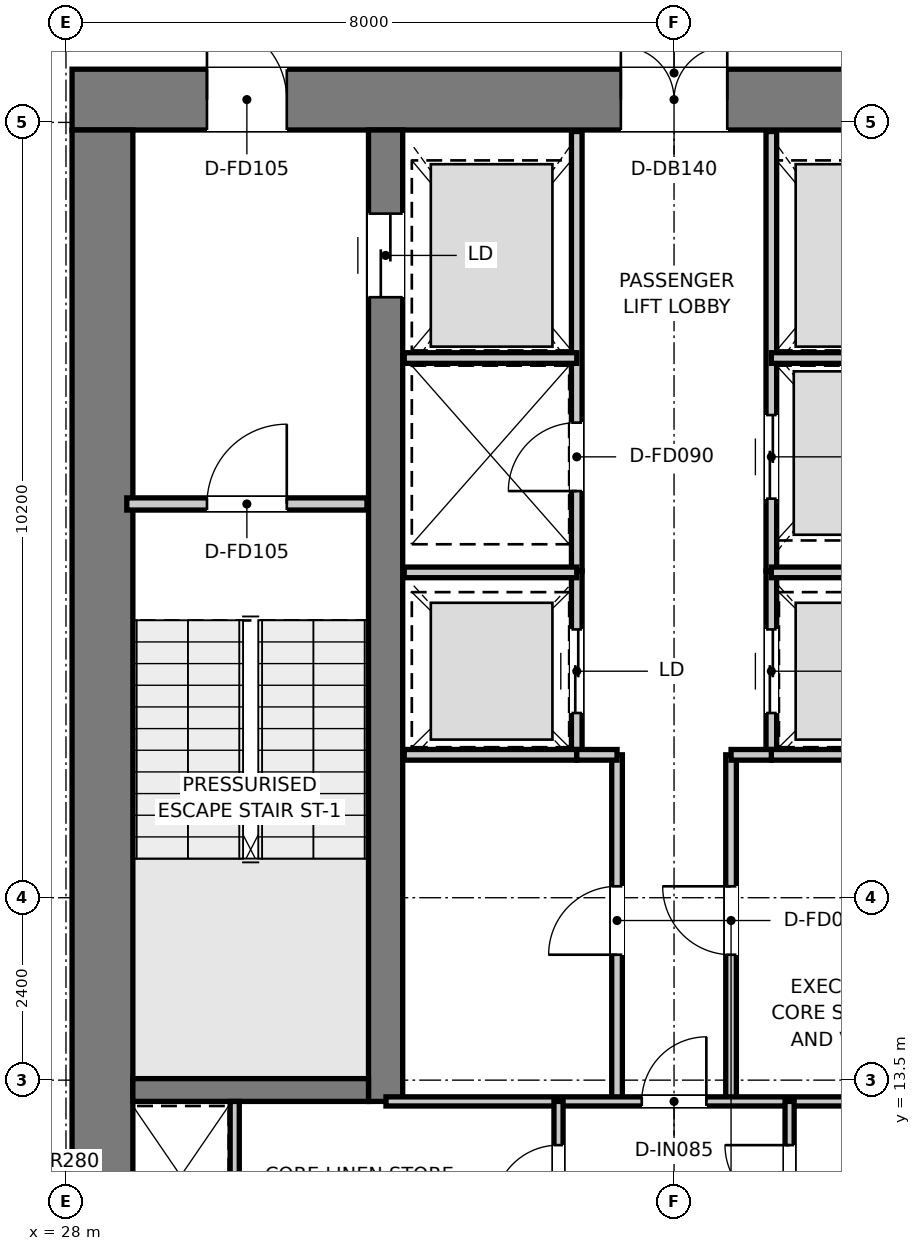
"""IFC4 building model, lengths in metres.
Left out: names, types, materials, properties, quantities, classifications, styles, units other than length and angle.
Written with IfcOpenShell. Run it as: python <this file> out.ifc"""

import sys

from ifc_helpers import new_model, si_unit, direction, frame, frame_2d, origin, place, context, subcontext, project, spatial, rectangle, extrude, element, fill, save


model = new_model("IFC4")
c1 = context("Model", 3, precision=1e-05, world=origin(), true_north=direction((0.0, 1.0)))
c2 = subcontext(c1, "Body", "Model", "MODEL_VIEW")
j1 = project(units=[si_unit("LENGTHUNIT", "METRE"), si_unit("PLANEANGLEUNIT", "RADIAN")], contexts=[c1])
p1 = place(None, origin())
s1 = spatial("IfcSite", under=j1, at=p1, CompositionType="ELEMENT")
p2 = place(p1, origin())
s2 = spatial("IfcBuilding", under=s1, at=p2, CompositionType="ELEMENT")
p3 = place(p2, frame((0.0, 0.0, 299.0)))
s3 = spatial("IfcBuildingStorey", under=s2, at=p3, CompositionType="ELEMENT", Elevation=299.0)
p4 = place(p3, frame((28.08, 26.4, 0.0), z_axis=(0.0, 0.0, 1.0), x_axis=(1.0, 0.0, 0.0)))
e1 = element("IfcWall", 1, at=p4, inside=s3, PredefinedType="SHEAR", context=c2, shape_type="SweptSolid", body=[
    extrude(rectangle(XDim=15.84, YDim=0.8, at=frame_2d((7.92, 0.0))), origin(), (0.0, 0.0, 1.0), 3.95),
])
p5 = place(p4, frame((7.22, 0.0, 0.0)))
e2 = element("IfcOpeningElement", 2, at=p5, cuts=e1, PredefinedType="OPENING", context=c2, shape_type="SweptSolid", body=[
    extrude(rectangle(XDim=1.4, YDim=2.2, at=frame_2d((0.7, 1.1))), frame((0.0, 0.41, 0.0), z_axis=(0.0, -1.0, 0.0), x_axis=(1.0, 0.0, 0.0)), (0.0, 0.0, 1.0), 0.82),
])
p6 = place(p4, frame((1.775, 0.0, 0.0)))
e3 = element("IfcOpeningElement", 3, at=p6, cuts=e1, PredefinedType="OPENING", context=c2, shape_type="SweptSolid", body=[
    extrude(rectangle(XDim=1.05, YDim=2.1, at=frame_2d((0.525, 1.05))), frame((0.0, 0.41, 0.0), z_axis=(0.0, -1.0, 0.0), x_axis=(1.0, 0.0, 0.0)), (0.0, 0.0, 1.0), 0.82),
])
p7 = place(p4, frame((13.015, 0.0, 0.0)))
e4 = element("IfcOpeningElement", 4, at=p7, cuts=e1, PredefinedType="OPENING", context=c2, shape_type="SweptSolid", body=[
    extrude(rectangle(XDim=1.05, YDim=2.1, at=frame_2d((0.525, 1.05))), frame((0.0, 0.41, 0.0), z_axis=(0.0, -1.0, 0.0), x_axis=(1.0, 0.0, 0.0)), (0.0, 0.0, 1.0), 0.82),
])
p8 = place(p3, frame((28.48, 11.3, 0.0), z_axis=(0.0, 0.0, 1.0), x_axis=(0.0, 1.0, 0.0)))
e5 = element("IfcWall", 5, at=p8, inside=s3, PredefinedType="SHEAR", context=c2, shape_type="SweptSolid", body=[
    extrude(rectangle(XDim=14.7, YDim=0.8, at=frame_2d((7.35, 0.0))), origin(), (0.0, 0.0, 1.0), 3.95),
])
p9 = place(p3, frame((32.205, 13.22, 0.0), z_axis=(0.0, 0.0, 1.0), x_axis=(0.0, 1.0, 0.0)))
e6 = element("IfcWall", 6, at=p9, inside=s3, PredefinedType="SHEAR", context=c2, shape_type="SweptSolid", body=[
    extrude(rectangle(XDim=12.78, YDim=0.45, at=frame_2d((6.39, 0.0))), origin(), (0.0, 0.0, 1.0), 3.95),
])
p10 = place(p9, frame((10.58, 0.0, 0.0)))
e7 = element("IfcOpeningElement", 7, at=p10, cuts=e6, PredefinedType="OPENING", context=c2, shape_type="SweptSolid", body=[
    extrude(rectangle(XDim=1.1, YDim=2.15, at=frame_2d((0.55, 1.075))), frame((0.0, 0.235, 0.0), z_axis=(0.0, -1.0, 0.0), x_axis=(1.0, 0.0, 0.0)), (0.0, 0.0, 1.0), 0.47),
])
p11 = place(p3, frame((28.88, 13.37, 0.0), z_axis=(0.0, 0.0, 1.0), x_axis=(1.0, 0.0, 0.0)))
e8 = element("IfcWall", 8, at=p11, inside=s3, PredefinedType="SHEAR", context=c2, shape_type="SweptSolid", body=[
    extrude(rectangle(XDim=3.1, YDim=0.3, at=frame_2d((1.55, 0.0))), origin(), (0.0, 0.0, 1.0), 3.95),
])
p12 = place(p3, frame((28.8, 21.08, 0.0), z_axis=(0.0, 0.0, 1.0), x_axis=(1.0, 0.0, 0.0)))
e9 = element("IfcWall", 9, at=p12, inside=s3, PredefinedType="PARTITIONING", context=c2, shape_type="SweptSolid", body=[
    extrude(rectangle(XDim=3.16, YDim=0.16, at=frame_2d((1.58, 0.0))), origin(), (0.0, 0.0, 1.0), 3.67),
])
p13 = place(p12, frame((1.055, 0.0, 0.0)))
e10 = element("IfcOpeningElement", 10, at=p13, cuts=e9, PredefinedType="OPENING", context=c2, shape_type="SweptSolid", body=[
    extrude(rectangle(XDim=1.05, YDim=2.1, at=frame_2d((0.525, 1.05))), frame((0.0, 0.09, 0.0), z_axis=(0.0, -1.0, 0.0), x_axis=(1.0, 0.0, 0.0)), (0.0, 0.0, 1.0), 0.18),
])
p14 = place(p3, frame((34.72, 20.2, 0.0), z_axis=(0.0, 0.0, 1.0), x_axis=(0.0, 1.0, 0.0)))
e11 = element("IfcWall", 11, at=p14, inside=s3, PredefinedType="PARTITIONING", context=c2, shape_type="SweptSolid", body=[
    extrude(rectangle(XDim=5.78, YDim=0.14, at=frame_2d((2.89, 0.0))), origin(), (0.0, 0.0, 1.0), 2.82),
])
p15 = place(p14, frame((1.05, 0.0, 0.0)))
e12 = element("IfcOpeningElement", 12, at=p15, cuts=e11, PredefinedType="OPENING", context=c2, shape_type="SweptSolid", body=[
    extrude(rectangle(XDim=0.9, YDim=2.1, at=frame_2d((0.45, 1.05))), frame((0.0, 0.08, 0.0), z_axis=(0.0, -1.0, 0.0), x_axis=(1.0, 0.0, 0.0)), (0.0, 0.0, 1.0), 0.16),
])
p16 = place(p3, frame((37.28, 20.2, 0.0), z_axis=(0.0, 0.0, 1.0), x_axis=(0.0, 1.0, 0.0)))
e13 = element("IfcWall", 13, at=p16, inside=s3, PredefinedType="PARTITIONING", context=c2, shape_type="SweptSolid", body=[
    extrude(rectangle(XDim=5.78, YDim=0.14, at=frame_2d((2.89, 0.0))), origin(), (0.0, 0.0, 1.0), 2.82),
])
p17 = place(p16, frame((0.95, 0.0, 0.0)))
e14 = element("IfcOpeningElement", 14, at=p17, cuts=e13, PredefinedType="OPENING", context=c2, shape_type="SweptSolid", body=[
    extrude(rectangle(XDim=1.1, YDim=2.15, at=frame_2d((0.55, 1.075))), frame((0.0, 0.08, 0.0), z_axis=(0.0, -1.0, 0.0), x_axis=(1.0, 0.0, 0.0)), (0.0, 0.0, 1.0), 0.16),
])
for number, where, z_axis, x_axis in (
    (15, (32.45, 23.0, 0.0), (0.0, 0.0, 1.0), (1.0, 0.0, 0.0)),
    (16, (37.28, 23.0, 0.0), (0.0, 0.0, 1.0), (1.0, 0.0, 0.0)),
):
    element("IfcWall", number, at=place(p3, frame(where, z_axis=z_axis, x_axis=x_axis)), inside=s3, PredefinedType="PARTITIONING", context=c2, shape_type="SweptSolid", body=[
        extrude(rectangle(XDim=2.27, YDim=0.14, at=frame_2d((1.135, 0.0))), origin(), (0.0, 0.0, 1.0), 2.82),
    ])
p18 = place(p3, frame((34.72, 17.78, 0.0), z_axis=(0.0, 0.0, 1.0), x_axis=(0.0, 1.0, 0.0)))
e17 = element("IfcWall", 17, at=p18, inside=s3, PredefinedType="PARTITIONING", context=c2, shape_type="SweptSolid", body=[
    extrude(rectangle(XDim=2.42, YDim=0.14, at=frame_2d((1.21, 0.0))), origin(), (0.0, 0.0, 1.0), 3.67),
])
p19 = place(p18, frame((0.55, 0.0, 0.0)))
e18 = element("IfcOpeningElement", 18, at=p19, cuts=e17, PredefinedType="OPENING", context=c2, shape_type="SweptSolid", body=[
    extrude(rectangle(XDim=1.1, YDim=2.15, at=frame_2d((0.55, 1.075))), frame((0.0, 0.08, 0.0), z_axis=(0.0, -1.0, 0.0), x_axis=(1.0, 0.0, 0.0)), (0.0, 0.0, 1.0), 0.16),
])
p20 = place(p3, frame((37.28, 17.78, 0.0), z_axis=(0.0, 0.0, 1.0), x_axis=(0.0, 1.0, 0.0)))
e19 = element("IfcWall", 19, at=p20, inside=s3, PredefinedType="PARTITIONING", context=c2, shape_type="SweptSolid", body=[
    extrude(rectangle(XDim=2.42, YDim=0.14, at=frame_2d((1.21, 0.0))), origin(), (0.0, 0.0, 1.0), 3.67),
])
p21 = place(p20, frame((0.55, 0.0, 0.0)))
e20 = element("IfcOpeningElement", 20, at=p21, cuts=e19, PredefinedType="OPENING", context=c2, shape_type="SweptSolid", body=[
    extrude(rectangle(XDim=1.1, YDim=2.15, at=frame_2d((0.55, 1.075))), frame((0.0, 0.08, 0.0), z_axis=(0.0, -1.0, 0.0), x_axis=(1.0, 0.0, 0.0)), (0.0, 0.0, 1.0), 0.16),
])
for number, where, z_axis, x_axis in (
    (21, (32.45, 17.78, 0.0), (0.0, 0.0, 1.0), (1.0, 0.0, 0.0)),
    (22, (32.45, 20.18, 0.0), (0.0, 0.0, 1.0), (1.0, 0.0, 0.0)),
    (23, (37.28, 17.78, 0.0), (0.0, 0.0, 1.0), (1.0, 0.0, 0.0)),
    (24, (37.28, 20.18, 0.0), (0.0, 0.0, 1.0), (1.0, 0.0, 0.0)),
):
    element("IfcWall", number, at=place(p3, frame(where, z_axis=z_axis, x_axis=x_axis)), inside=s3, PredefinedType="PARTITIONING", context=c2, shape_type="SweptSolid", body=[
        extrude(rectangle(XDim=2.27, YDim=0.14, at=frame_2d((1.135, 0.0))), origin(), (0.0, 0.0, 1.0), 3.67),
    ])
p22 = place(p3, frame((35.25, 13.22, 0.0), z_axis=(0.0, 0.0, 1.0), x_axis=(0.0, 1.0, 0.0)))
e25 = element("IfcWall", 25, at=p22, inside=s3, PredefinedType="PARTITIONING", context=c2, shape_type="SweptSolid", body=[
    extrude(rectangle(XDim=4.56, YDim=0.14, at=frame_2d((2.28, 0.0))), origin(), (0.0, 0.0, 1.0), 3.67),
])
p23 = place(p22, frame((1.93, 0.0, 0.0)))
e26 = element("IfcOpeningElement", 26, at=p23, cuts=e25, PredefinedType="OPENING", context=c2, shape_type="SweptSolid", body=[
    extrude(rectangle(XDim=0.9, YDim=2.1, at=frame_2d((0.45, 1.05))), frame((0.0, 0.08, 0.0), z_axis=(0.0, -1.0, 0.0), x_axis=(1.0, 0.0, 0.0)), (0.0, 0.0, 1.0), 0.16),
])
p24 = place(p3, frame((34.72, 17.78, 0.0), z_axis=(0.0, 0.0, 1.0), x_axis=(1.0, 0.0, 0.0)))
e27 = element("IfcWall", 27, at=p24, inside=s3, PredefinedType="PARTITIONING", context=c2, shape_type="SweptSolid", body=[
    extrude(rectangle(XDim=0.53, YDim=0.14, at=frame_2d((0.265, 0.0))), origin(), (0.0, 0.0, 1.0), 3.67),
])
p25 = place(p3, frame((36.75, 13.22, 0.0), z_axis=(0.0, 0.0, 1.0), x_axis=(0.0, 1.0, 0.0)))
e28 = element("IfcWall", 28, at=p25, inside=s3, PredefinedType="PARTITIONING", context=c2, shape_type="SweptSolid", body=[
    extrude(rectangle(XDim=4.56, YDim=0.14, at=frame_2d((2.28, 0.0))), origin(), (0.0, 0.0, 1.0), 3.67),
])
p26 = place(p25, frame((1.93, 0.0, 0.0)))
e29 = element("IfcOpeningElement", 29, at=p26, cuts=e28, PredefinedType="OPENING", context=c2, shape_type="SweptSolid", body=[
    extrude(rectangle(XDim=0.9, YDim=2.1, at=frame_2d((0.45, 1.05))), frame((0.0, 0.08, 0.0), z_axis=(0.0, -1.0, 0.0), x_axis=(1.0, 0.0, 0.0)), (0.0, 0.0, 1.0), 0.16),
])
p27 = place(p3, frame((36.75, 17.78, 0.0), z_axis=(0.0, 0.0, 1.0), x_axis=(1.0, 0.0, 0.0)))
e30 = element("IfcWall", 30, at=p27, inside=s3, PredefinedType="PARTITIONING", context=c2, shape_type="SweptSolid", body=[
    extrude(rectangle(XDim=0.53, YDim=0.14, at=frame_2d((0.265, 0.0))), origin(), (0.0, 0.0, 1.0), 3.67),
])
p28 = place(p3, frame((30.22, 11.25, 0.0), z_axis=(0.0, 0.0, 1.0), x_axis=(0.0, 1.0, 0.0)))
e31 = element("IfcWall", 31, at=p28, inside=s3, PredefinedType="PARTITIONING", context=c2, shape_type="SweptSolid", body=[
    extrude(rectangle(XDim=1.97, YDim=0.12, at=frame_2d((0.985, 0.0))), origin(), (0.0, 0.0, 1.0), 3.67),
])
p29 = place(p3, frame((32.21, 13.22, 0.0), z_axis=(0.0, 0.0, 1.0), x_axis=(1.0, 0.0, 0.0)))
e32 = element("IfcWall", 32, at=p29, inside=s3, PredefinedType="PARTITIONING", context=c2, shape_type="SweptSolid", body=[
    extrude(rectangle(XDim=7.58, YDim=0.12, at=frame_2d((3.79, 0.0))), origin(), (0.0, 0.0, 1.0), 3.67),
])
p30 = place(p29, frame((3.365, 0.0, 0.0)))
e33 = element("IfcOpeningElement", 33, at=p30, cuts=e32, PredefinedType="OPENING", context=c2, shape_type="SweptSolid", body=[
    extrude(rectangle(XDim=0.85, YDim=2.1, at=frame_2d((0.425, 1.05))), frame((0.0, 0.07, 0.0), z_axis=(0.0, -1.0, 0.0), x_axis=(1.0, 0.0, 0.0)), (0.0, 0.0, 1.0), 0.14),
])
p31 = place(p3, frame((34.48, 11.25, 0.0), z_axis=(0.0, 0.0, 1.0), x_axis=(0.0, 1.0, 0.0)))
e34 = element("IfcWall", 34, at=p31, inside=s3, PredefinedType="PARTITIONING", context=c2, shape_type="SweptSolid", body=[
    extrude(rectangle(XDim=1.97, YDim=0.12, at=frame_2d((0.985, 0.0))), origin(), (0.0, 0.0, 1.0), 3.67),
])
p32 = place(p31, frame((0.545, 0.0, 0.0)))
e35 = element("IfcOpeningElement", 35, at=p32, cuts=e34, PredefinedType="OPENING", context=c2, shape_type="SweptSolid", body=[
    extrude(rectangle(XDim=0.85, YDim=2.1, at=frame_2d((0.425, 1.05))), frame((0.0, 0.07, 0.0), z_axis=(0.0, -1.0, 0.0), x_axis=(1.0, 0.0, 0.0)), (0.0, 0.0, 1.0), 0.14),
])
p33 = place(p3, frame((37.52, 11.25, 0.0), z_axis=(0.0, 0.0, 1.0), x_axis=(0.0, 1.0, 0.0)))
e36 = element("IfcWall", 36, at=p33, inside=s3, PredefinedType="PARTITIONING", context=c2, shape_type="SweptSolid", body=[
    extrude(rectangle(XDim=1.97, YDim=0.12, at=frame_2d((0.985, 0.0))), origin(), (0.0, 0.0, 1.0), 3.67),
])
p34 = place(p33, frame((0.545, 0.0, 0.0)))
e37 = element("IfcOpeningElement", 37, at=p34, cuts=e36, PredefinedType="OPENING", context=c2, shape_type="SweptSolid", body=[
    extrude(rectangle(XDim=0.85, YDim=2.1, at=frame_2d((0.425, 1.05))), frame((0.0, 0.07, 0.0), z_axis=(0.0, -1.0, 0.0), x_axis=(1.0, 0.0, 0.0)), (0.0, 0.0, 1.0), 0.14),
])
p35 = place(p13, origin())
e38 = element("IfcDoor", 38, at=p35, inside=s3, OperationType="SINGLE_SWING_RIGHT", PredefinedType="DOOR", context=c2, shape_type="SweptSolid", body=[
    extrude(rectangle(XDim=1.05, YDim=2.1, at=frame_2d((0.525, 1.05))), frame((0.0, 0.025, 0.0), z_axis=(0.0, -1.0, 0.0), x_axis=(1.0, 0.0, 0.0)), (0.0, 0.0, 1.0), 0.05),
])
fill(e10, e38)
p36 = place(p5, origin())
e39 = element("IfcDoor", 39, at=p36, inside=s3, OperationType="DOUBLE_DOOR_SINGLE_SWING", PredefinedType="DOOR", context=c2, shape_type="SweptSolid", body=[
    extrude(rectangle(XDim=1.4, YDim=2.2, at=frame_2d((0.7, 1.1))), frame((0.0, 0.025, 0.0), z_axis=(0.0, -1.0, 0.0), x_axis=(1.0, 0.0, 0.0)), (0.0, 0.0, 1.0), 0.05),
])
fill(e2, e39)
p37 = place(p6, origin())
e40 = element("IfcDoor", 40, at=p37, inside=s3, OperationType="SINGLE_SWING_LEFT", PredefinedType="DOOR", context=c2, shape_type="SweptSolid", body=[
    extrude(rectangle(XDim=1.05, YDim=2.1, at=frame_2d((0.525, 1.05))), frame((0.0, 0.025, 0.0), z_axis=(0.0, -1.0, 0.0), x_axis=(1.0, 0.0, 0.0)), (0.0, 0.0, 1.0), 0.05),
])
fill(e3, e40)
p38 = place(p10, origin())
e41 = element("IfcDoor", 41, at=p38, inside=s3, OperationType="DOUBLE_DOOR_SLIDING", PredefinedType="DOOR", context=c2, shape_type="SweptSolid", body=[
    extrude(rectangle(XDim=1.1, YDim=2.15, at=frame_2d((0.55, 1.075))), frame((0.0, 0.025, 0.0), z_axis=(0.0, -1.0, 0.0), x_axis=(1.0, 0.0, 0.0)), (0.0, 0.0, 1.0), 0.05),
])
fill(e7, e41)
p39 = place(p15, origin())
e42 = element("IfcDoor", 42, at=p39, inside=s3, OperationType="SINGLE_SWING_LEFT", PredefinedType="DOOR", context=c2, shape_type="SweptSolid", body=[
    extrude(rectangle(XDim=0.9, YDim=2.1, at=frame_2d((0.45, 1.05))), frame((0.0, 0.025, 0.0), z_axis=(0.0, -1.0, 0.0), x_axis=(1.0, 0.0, 0.0)), (0.0, 0.0, 1.0), 0.05),
])
fill(e12, e42)
p40 = place(p17, origin())
e43 = element("IfcDoor", 43, at=p40, inside=s3, OperationType="DOUBLE_DOOR_SLIDING", PredefinedType="DOOR", context=c2, shape_type="SweptSolid", body=[
    extrude(rectangle(XDim=1.1, YDim=2.15, at=frame_2d((0.55, 1.075))), frame((0.0, 0.025, 0.0), z_axis=(0.0, -1.0, 0.0), x_axis=(1.0, 0.0, 0.0)), (0.0, 0.0, 1.0), 0.05),
])
fill(e14, e43)
p41 = place(p19, origin())
e44 = element("IfcDoor", 44, at=p41, inside=s3, OperationType="DOUBLE_DOOR_SLIDING", PredefinedType="DOOR", context=c2, shape_type="SweptSolid", body=[
    extrude(rectangle(XDim=1.1, YDim=2.15, at=frame_2d((0.55, 1.075))), frame((0.0, 0.025, 0.0), z_axis=(0.0, -1.0, 0.0), x_axis=(1.0, 0.0, 0.0)), (0.0, 0.0, 1.0), 0.05),
])
fill(e18, e44)
p42 = place(p21, origin())
e45 = element("IfcDoor", 45, at=p42, inside=s3, OperationType="DOUBLE_DOOR_SLIDING", PredefinedType="DOOR", context=c2, shape_type="SweptSolid", body=[
    extrude(rectangle(XDim=1.1, YDim=2.15, at=frame_2d((0.55, 1.075))), frame((0.0, 0.025, 0.0), z_axis=(0.0, -1.0, 0.0), x_axis=(1.0, 0.0, 0.0)), (0.0, 0.0, 1.0), 0.05),
])
fill(e20, e45)
p43 = place(p23, origin())
e46 = element("IfcDoor", 46, at=p43, inside=s3, OperationType="SINGLE_SWING_LEFT", PredefinedType="DOOR", context=c2, shape_type="SweptSolid", body=[
    extrude(rectangle(XDim=0.9, YDim=2.1, at=frame_2d((0.45, 1.05))), frame((0.0, 0.025, 0.0), z_axis=(0.0, -1.0, 0.0), x_axis=(1.0, 0.0, 0.0)), (0.0, 0.0, 1.0), 0.05),
])
fill(e26, e46)
p44 = place(p26, origin())
e47 = element("IfcDoor", 47, at=p44, inside=s3, OperationType="SINGLE_SWING_RIGHT", PredefinedType="DOOR", context=c2, shape_type="SweptSolid", body=[
    extrude(rectangle(XDim=0.9, YDim=2.1, at=frame_2d((0.45, 1.05))), frame((0.0, 0.025, 0.0), z_axis=(0.0, -1.0, 0.0), x_axis=(1.0, 0.0, 0.0)), (0.0, 0.0, 1.0), 0.05),
])
fill(e29, e47)
p45 = place(p30, origin())
e48 = element("IfcDoor", 48, at=p45, inside=s3, OperationType="SINGLE_SWING_RIGHT", PredefinedType="DOOR", context=c2, shape_type="SweptSolid", body=[
    extrude(rectangle(XDim=0.85, YDim=2.1, at=frame_2d((0.425, 1.05))), frame((0.0, 0.025, 0.0), z_axis=(0.0, -1.0, 0.0), x_axis=(1.0, 0.0, 0.0)), (0.0, 0.0, 1.0), 0.05),
])
fill(e33, e48)
p46 = place(p32, origin())
e49 = element("IfcDoor", 49, at=p46, inside=s3, OperationType="SINGLE_SWING_LEFT", PredefinedType="DOOR", context=c2, shape_type="SweptSolid", body=[
    extrude(rectangle(XDim=0.85, YDim=2.1, at=frame_2d((0.425, 1.05))), frame((0.0, 0.025, 0.0), z_axis=(0.0, -1.0, 0.0), x_axis=(1.0, 0.0, 0.0)), (0.0, 0.0, 1.0), 0.05),
])
fill(e35, e49)
p47 = place(p34, origin())
e50 = element("IfcDoor", 50, at=p47, inside=s3, OperationType="SINGLE_SWING_RIGHT", PredefinedType="DOOR", context=c2, shape_type="SweptSolid", body=[
    extrude(rectangle(XDim=0.85, YDim=2.1, at=frame_2d((0.425, 1.05))), frame((0.0, 0.025, 0.0), z_axis=(0.0, -1.0, 0.0), x_axis=(1.0, 0.0, 0.0)), (0.0, 0.0, 1.0), 0.05),
])
fill(e37, e50)
save(model, sys.argv[1])
